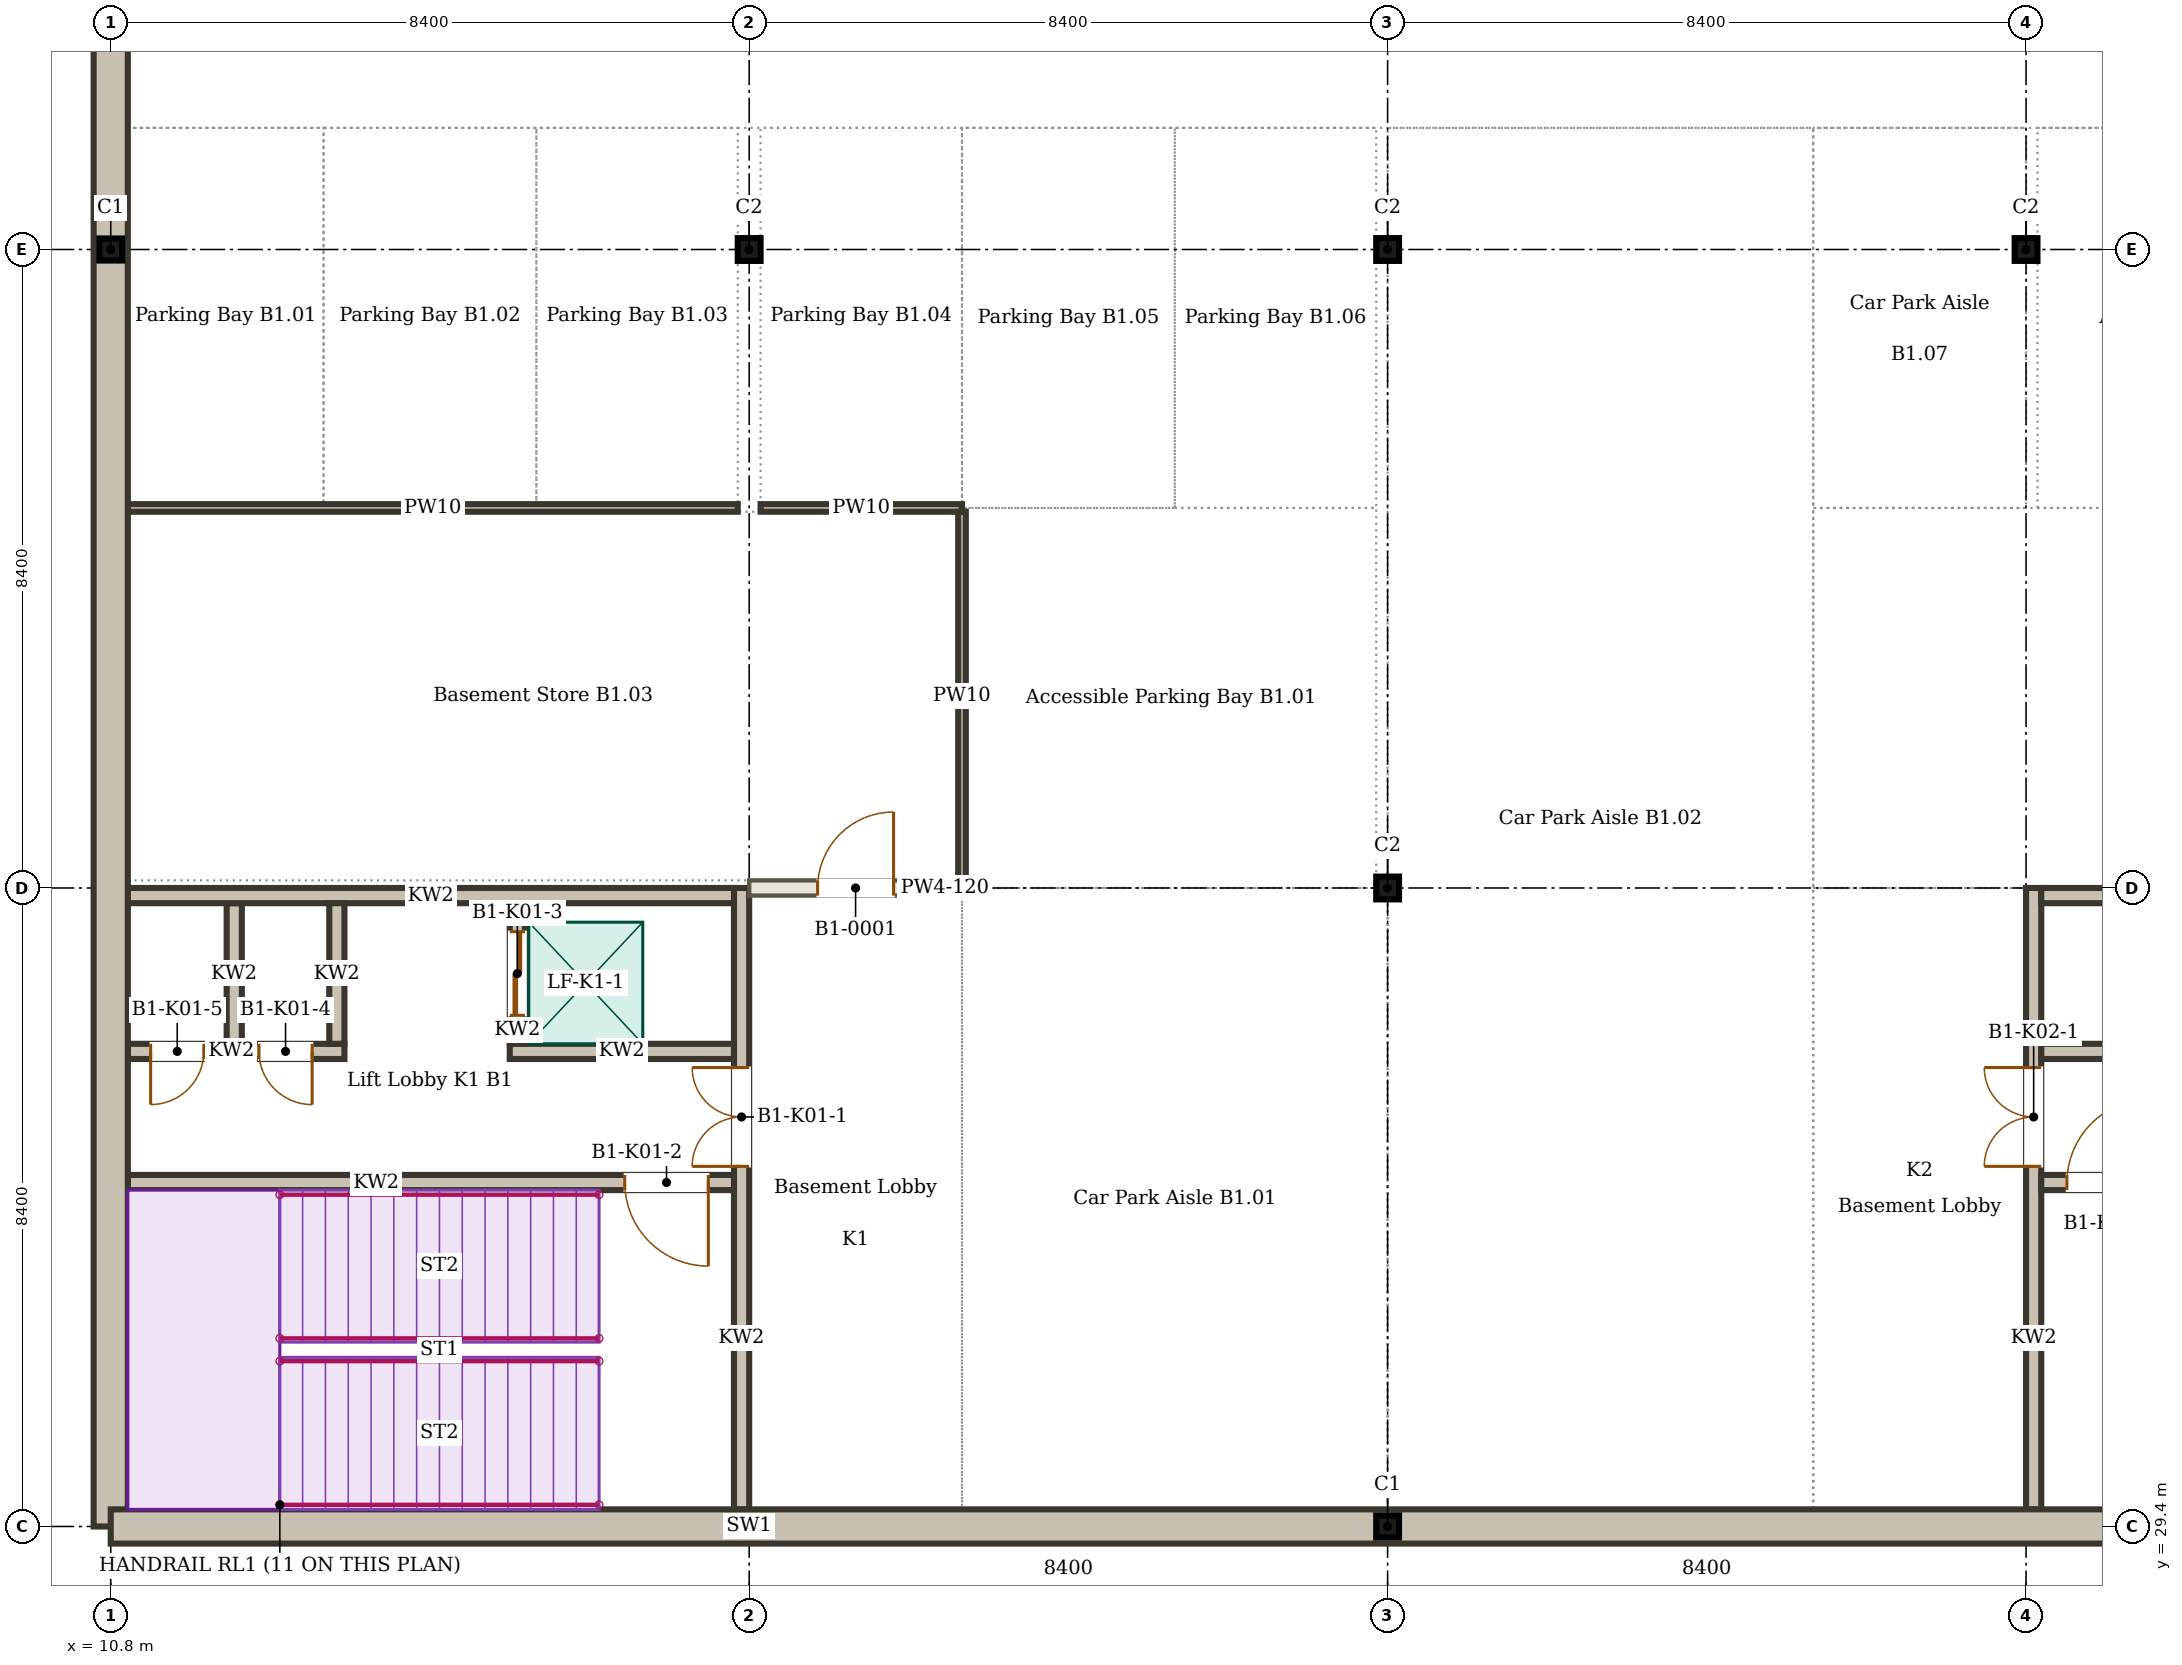
"""IFC4 building model, lengths in metres.
Left out: names, types, materials, properties, quantities, classifications, styles, units other than length and angle.
Written with IfcOpenShell. Run it as: python <this file> out.ifc"""

import sys

from ifc_helpers import new_model, si_unit, direction, frame, frame_2d, origin, origin_2d, place, context, subcontext, project, spatial, rectangle, i_section, extrude, element, fill, save


model = new_model("IFC4")
c1 = context("Model", 3, precision=1e-05, world=origin(), true_north=direction((0.0, 1.0)))
c2 = subcontext(c1, "Body", "Model", "MODEL_VIEW")
j1 = project(units=[si_unit("LENGTHUNIT", "METRE"), si_unit("PLANEANGLEUNIT", "RADIAN")], contexts=[c1])
p1 = place(None, origin())
s1 = spatial("IfcSite", under=j1, at=p1, CompositionType="ELEMENT")
p2 = place(p1, origin())
s2 = spatial("IfcBuilding", under=s1, at=p2, CompositionType="ELEMENT")
p3 = place(p2, frame((0.0, 0.0, -4.5)))
s3 = spatial("IfcBuildingStorey", under=s2, at=p3, CompositionType="ELEMENT", Elevation=-4.5)
p4 = place(p3, frame((27.6, 29.4, 0.0), z_axis=(0.0, 0.0, 1.0), x_axis=(1.0, 0.0, 0.0)))
e1 = element("IfcColumn", 1, at=p4, inside=s3, PredefinedType="COLUMN", context=c2, shape_type="SweptSolid", body=[
    extrude(i_section(OverallWidth=0.3, OverallDepth=0.29, WebThickness=0.009, FlangeThickness=0.014, FilletRadius=0.027, at=origin_2d()), origin(), (0.0, 0.0, 1.0), 4.5),
])
p5 = place(p3, frame((27.6, 37.8, 0.0), z_axis=(0.0, 0.0, 1.0), x_axis=(1.0, 0.0, 0.0)))
e2 = element("IfcColumn", 2, at=p5, inside=s3, PredefinedType="COLUMN", context=c2, shape_type="SweptSolid", body=[
    extrude(i_section(OverallWidth=0.3, OverallDepth=0.3, WebThickness=0.011, FlangeThickness=0.019, FilletRadius=0.027, at=origin_2d()), origin(), (0.0, 0.0, 1.0), 4.5),
])
p6 = place(p3, frame((10.8, 46.2, 0.0), z_axis=(0.0, 0.0, 1.0), x_axis=(1.0, 0.0, 0.0)))
e3 = element("IfcColumn", 3, at=p6, inside=s3, PredefinedType="COLUMN", context=c2, shape_type="SweptSolid", body=[
    extrude(i_section(OverallWidth=0.3, OverallDepth=0.29, WebThickness=0.009, FlangeThickness=0.014, FilletRadius=0.027, at=origin_2d()), origin(), (0.0, 0.0, 1.0), 4.5),
])
for number, where, z_axis, x_axis in (
    (4, (19.2, 46.2, 0.0), (0.0, 0.0, 1.0), (1.0, 0.0, 0.0)),
    (5, (27.6, 46.2, 0.0), (0.0, 0.0, 1.0), (1.0, 0.0, 0.0)),
    (6, (36.0, 46.2, 0.0), (0.0, 0.0, 1.0), (1.0, 0.0, 0.0)),
):
    element("IfcColumn", number, at=place(p3, frame(where, z_axis=z_axis, x_axis=x_axis)), inside=s3, PredefinedType="COLUMN", context=c2, shape_type="SweptSolid", body=[
        extrude(i_section(OverallWidth=0.3, OverallDepth=0.3, WebThickness=0.011, FlangeThickness=0.019, FilletRadius=0.027, at=origin_2d()), origin(), (0.0, 0.0, 1.0), 4.5),
    ])
p7 = place(p3, frame((10.8, 96.6, 0.0), z_axis=(0.0, 0.0, 1.0), x_axis=(0.0, -1.0, 0.0)))
e7 = element("IfcWall", 7, at=p7, inside=s3, PredefinedType="SOLIDWALL", context=c2, shape_type="SweptSolid", body=[
    extrude(rectangle(XDim=67.2, YDim=0.45, at=frame_2d((33.6, 0.0))), origin(), (0.0, 0.0, 1.0), 4.35),
])
p8 = place(p3, frame((10.8, 29.4, 0.0), z_axis=(0.0, 0.0, 1.0), x_axis=(1.0, 0.0, 0.0)))
e8 = element("IfcWall", 8, at=p8, inside=s3, PredefinedType="SOLIDWALL", context=c2, shape_type="SweptSolid", body=[
    extrude(rectangle(XDim=33.6, YDim=0.45, at=frame_2d((16.8, 0.0))), origin(), (0.0, 0.0, 1.0), 4.35),
])
p9 = place(p3, frame((19.2, 37.8, 0.0), z_axis=(0.0, 0.0, 1.0), x_axis=(1.0, 0.0, 0.0)))
e9 = element("IfcWall", 9, at=p9, inside=s3, PredefinedType="PARTITIONING", context=c2, shape_type="SweptSolid", body=[
    extrude(rectangle(XDim=2.8, YDim=0.2, at=frame_2d((1.4, 0.0))), origin(), (0.0, 0.0, 1.0), 3.8),
])
p10 = place(p9, frame((0.9, 0.0, 0.0)))
e10 = element("IfcOpeningElement", 10, at=p10, cuts=e9, PredefinedType="OPENING", context=c2, shape_type="SweptSolid", body=[
    extrude(rectangle(XDim=1.0, YDim=2.1, at=frame_2d((0.5, 1.05))), frame((0.0, 0.11, 0.0), z_axis=(0.0, -1.0, 0.0), x_axis=(1.0, 0.0, 0.0)), (0.0, 0.0, 1.0), 0.22),
])
p11 = place(p3, frame((11.025, 42.8, 0.0), z_axis=(0.0, 0.0, 1.0), x_axis=(1.0, 0.0, 0.0)))
e11 = element("IfcWall", 11, at=p11, inside=s3, PredefinedType="SOLIDWALL", context=c2, shape_type="SweptSolid", body=[
    extrude(rectangle(XDim=8.025, YDim=0.1, at=frame_2d((4.013, 0.0))), origin(), (0.0, 0.0, 1.0), 3.95),
])
p12 = place(p3, frame((19.35, 42.8, 0.0), z_axis=(0.0, 0.0, 1.0), x_axis=(1.0, 0.0, 0.0)))
e12 = element("IfcWall", 12, at=p12, inside=s3, PredefinedType="SOLIDWALL", context=c2, shape_type="SweptSolid", body=[
    extrude(rectangle(XDim=2.65, YDim=0.1, at=frame_2d((1.325, 0.0))), origin(), (0.0, 0.0, 1.0), 3.95),
])
p13 = place(p3, frame((22.0, 37.9, 0.0), z_axis=(0.0, 0.0, 1.0), x_axis=(0.0, 1.0, 0.0)))
e13 = element("IfcWall", 13, at=p13, inside=s3, PredefinedType="SOLIDWALL", context=c2, shape_type="SweptSolid", body=[
    extrude(rectangle(XDim=4.85, YDim=0.1, at=frame_2d((2.425, 0.0))), origin(), (0.0, 0.0, 1.0), 3.8),
])
p14 = place(p3, frame((19.1, 29.625, 0.0), z_axis=(0.0, 0.0, 1.0), x_axis=(0.0, 1.0, 0.0)))
e14 = element("IfcWall", 14, at=p14, inside=s3, PredefinedType="SOLIDWALL", context=c2, shape_type="SweptSolid", body=[
    extrude(rectangle(XDim=8.175, YDim=0.2, at=frame_2d((4.087, 0.0))), origin(), (0.0, 0.0, 1.0), 4.5),
])
p15 = place(p14, frame((4.512, 0.0, 0.0)))
e15 = element("IfcOpeningElement", 15, at=p15, cuts=e14, PredefinedType="OPENING", context=c2, shape_type="SweptSolid", body=[
    extrude(rectangle(XDim=1.3, YDim=2.1, at=frame_2d((0.65, 1.05))), frame((0.0, 0.11, 0.0), z_axis=(0.0, -1.0, 0.0), x_axis=(1.0, 0.0, 0.0)), (0.0, 0.0, 1.0), 0.22),
])
p16 = place(p3, frame((19.0, 37.7, 0.0), z_axis=(0.0, 0.0, 1.0), x_axis=(-1.0, 0.0, 0.0)))
e16 = element("IfcWall", 16, at=p16, inside=s3, PredefinedType="SOLIDWALL", context=c2, shape_type="SweptSolid", body=[
    extrude(rectangle(XDim=7.975, YDim=0.2, at=frame_2d((3.988, 0.0))), origin(), (0.0, 0.0, 1.0), 4.5),
])
p17 = place(p3, frame((19.0, 33.925, 0.0), z_axis=(0.0, 0.0, 1.0), x_axis=(-1.0, 0.0, 0.0)))
e17 = element("IfcWall", 17, at=p17, inside=s3, PredefinedType="SOLIDWALL", context=c2, shape_type="SweptSolid", body=[
    extrude(rectangle(XDim=7.975, YDim=0.2, at=frame_2d((3.988, 0.0))), origin(), (0.0, 0.0, 1.0), 4.5),
])
p18 = place(p17, frame((0.337, 0.0, 0.0)))
e18 = element("IfcOpeningElement", 18, at=p18, cuts=e17, PredefinedType="OPENING", context=c2, shape_type="SweptSolid", body=[
    extrude(rectangle(XDim=1.1, YDim=2.1, at=frame_2d((0.55, 1.05))), frame((0.0, 0.11, 0.0), z_axis=(0.0, -1.0, 0.0), x_axis=(1.0, 0.0, 0.0)), (0.0, 0.0, 1.0), 0.22),
])
p19 = place(p3, frame((19.0, 35.65, 0.0), z_axis=(0.0, 0.0, 1.0), x_axis=(-1.0, 0.0, 0.0)))
e19 = element("IfcWall", 19, at=p19, inside=s3, PredefinedType="SOLIDWALL", context=c2, shape_type="SweptSolid", body=[
    extrude(rectangle(XDim=2.95, YDim=0.2, at=frame_2d((1.475, 0.0))), origin(), (0.0, 0.0, 1.0), 4.5),
])
p20 = place(p3, frame((13.875, 35.65, 0.0), z_axis=(0.0, 0.0, 1.0), x_axis=(-1.0, 0.0, 0.0)))
e20 = element("IfcWall", 20, at=p20, inside=s3, PredefinedType="SOLIDWALL", context=c2, shape_type="SweptSolid", body=[
    extrude(rectangle(XDim=2.85, YDim=0.2, at=frame_2d((1.425, 0.0))), origin(), (0.0, 0.0, 1.0), 4.35),
])
p21 = place(p20, frame((0.425, 0.0, 0.0)))
e21 = element("IfcOpeningElement", 21, at=p21, cuts=e20, PredefinedType="OPENING", context=c2, shape_type="SweptSolid", body=[
    extrude(rectangle(XDim=0.7, YDim=2.1, at=frame_2d((0.35, 1.05))), frame((0.0, 0.11, 0.0), z_axis=(0.0, -1.0, 0.0), x_axis=(1.0, 0.0, 0.0)), (0.0, 0.0, 1.0), 0.22),
])
p22 = place(p20, frame((1.85, 0.0, 0.0)))
e22 = element("IfcOpeningElement", 22, at=p22, cuts=e20, PredefinedType="OPENING", context=c2, shape_type="SweptSolid", body=[
    extrude(rectangle(XDim=0.7, YDim=2.1, at=frame_2d((0.35, 1.05))), frame((0.0, 0.11, 0.0), z_axis=(0.0, -1.0, 0.0), x_axis=(1.0, 0.0, 0.0)), (0.0, 0.0, 1.0), 0.22),
])
p23 = place(p3, frame((16.15, 35.75, 0.0), z_axis=(0.0, 0.0, 1.0), x_axis=(0.0, 1.0, 0.0)))
e23 = element("IfcWall", 23, at=p23, inside=s3, PredefinedType="SOLIDWALL", context=c2, shape_type="SweptSolid", body=[
    extrude(rectangle(XDim=1.85, YDim=0.2, at=frame_2d((0.925, 0.0))), origin(), (0.0, 0.0, 1.0), 4.5),
])
p24 = place(p23, frame((0.375, 0.0, 0.0)))
e24 = element("IfcOpeningElement", 24, at=p24, cuts=e23, PredefinedType="OPENING", context=c2, shape_type="SweptSolid", body=[
    extrude(rectangle(XDim=1.1, YDim=2.1, at=frame_2d((0.55, 1.05))), frame((0.0, 0.11, 0.0), z_axis=(0.0, -1.0, 0.0), x_axis=(1.0, 0.0, 0.0)), (0.0, 0.0, 1.0), 0.22),
])
for number, where, z_axis, x_axis in (
    (25, (13.775, 35.75, 0.0), (0.0, 0.0, 1.0), (0.0, 1.0, 0.0)),
    (26, (12.425, 35.75, 0.0), (0.0, 0.0, 1.0), (0.0, 1.0, 0.0)),
):
    element("IfcWall", number, at=place(p3, frame(where, z_axis=z_axis, x_axis=x_axis)), inside=s3, PredefinedType="SOLIDWALL", context=c2, shape_type="SweptSolid", body=[
        extrude(rectangle(XDim=1.85, YDim=0.2, at=frame_2d((0.925, 0.0))), origin(), (0.0, 0.0, 1.0), 4.35),
    ])
p25 = place(p3, frame((36.1, 29.625, 0.0), z_axis=(0.0, 0.0, 1.0), x_axis=(0.0, 1.0, 0.0)))
e27 = element("IfcWall", 27, at=p25, inside=s3, PredefinedType="SOLIDWALL", context=c2, shape_type="SweptSolid", body=[
    extrude(rectangle(XDim=8.175, YDim=0.2, at=frame_2d((4.087, 0.0))), origin(), (0.0, 0.0, 1.0), 4.5),
])
p26 = place(p25, frame((4.512, 0.0, 0.0)))
e28 = element("IfcOpeningElement", 28, at=p26, cuts=e27, PredefinedType="OPENING", context=c2, shape_type="SweptSolid", body=[
    extrude(rectangle(XDim=1.3, YDim=2.1, at=frame_2d((0.65, 1.05))), frame((0.0, 0.11, 0.0), z_axis=(0.0, -1.0, 0.0), x_axis=(1.0, 0.0, 0.0)), (0.0, 0.0, 1.0), 0.22),
])
p27 = place(p3, frame((36.2, 37.7, 0.0), z_axis=(0.0, 0.0, 1.0), x_axis=(1.0, 0.0, 0.0)))
e29 = element("IfcWall", 29, at=p27, inside=s3, PredefinedType="SOLIDWALL", context=c2, shape_type="SweptSolid", body=[
    extrude(rectangle(XDim=7.975, YDim=0.2, at=frame_2d((3.988, 0.0))), origin(), (0.0, 0.0, 1.0), 4.5),
])
p28 = place(p3, frame((36.2, 33.925, 0.0), z_axis=(0.0, 0.0, 1.0), x_axis=(1.0, 0.0, 0.0)))
e30 = element("IfcWall", 30, at=p28, inside=s3, PredefinedType="SOLIDWALL", context=c2, shape_type="SweptSolid", body=[
    extrude(rectangle(XDim=7.975, YDim=0.2, at=frame_2d((3.988, 0.0))), origin(), (0.0, 0.0, 1.0), 4.5),
])
p29 = place(p28, frame((0.337, 0.0, 0.0)))
e31 = element("IfcOpeningElement", 31, at=p29, cuts=e30, PredefinedType="OPENING", context=c2, shape_type="SweptSolid", body=[
    extrude(rectangle(XDim=1.1, YDim=2.1, at=frame_2d((0.55, 1.05))), frame((0.0, 0.11, 0.0), z_axis=(0.0, -1.0, 0.0), x_axis=(1.0, 0.0, 0.0)), (0.0, 0.0, 1.0), 0.22),
])
p30 = place(p3, frame((36.2, 35.65, 0.0), z_axis=(0.0, 0.0, 1.0), x_axis=(1.0, 0.0, 0.0)))
e32 = element("IfcWall", 32, at=p30, inside=s3, PredefinedType="SOLIDWALL", context=c2, shape_type="SweptSolid", body=[
    extrude(rectangle(XDim=2.95, YDim=0.2, at=frame_2d((1.475, 0.0))), origin(), (0.0, 0.0, 1.0), 4.5),
])
p31 = place(p10, origin())
e33 = element("IfcDoor", 33, at=p31, inside=s3, OperationType="SINGLE_SWING_RIGHT", PredefinedType="DOOR", context=c2, shape_type="SweptSolid", body=[
    extrude(rectangle(XDim=1.0, YDim=2.1, at=frame_2d((0.5, 1.05))), frame((0.0, 0.025, 0.0), z_axis=(0.0, -1.0, 0.0), x_axis=(1.0, 0.0, 0.0)), (0.0, 0.0, 1.0), 0.05),
])
fill(e10, e33)
p32 = place(p15, origin())
e34 = element("IfcDoor", 34, at=p32, inside=s3, OperationType="DOUBLE_DOOR_DOUBLE_SWING", PredefinedType="DOOR", context=c2, shape_type="SweptSolid", body=[
    extrude(rectangle(XDim=1.3, YDim=2.1, at=frame_2d((0.65, 1.05))), frame((0.0, 0.025, 0.0), z_axis=(0.0, -1.0, 0.0), x_axis=(1.0, 0.0, 0.0)), (0.0, 0.0, 1.0), 0.05),
])
fill(e15, e34)
p33 = place(p18, origin())
e35 = element("IfcDoor", 35, at=p33, inside=s3, OperationType="SINGLE_SWING_LEFT", PredefinedType="DOOR", context=c2, shape_type="SweptSolid", body=[
    extrude(rectangle(XDim=1.1, YDim=2.1, at=frame_2d((0.55, 1.05))), frame((0.0, 0.025, 0.0), z_axis=(0.0, -1.0, 0.0), x_axis=(1.0, 0.0, 0.0)), (0.0, 0.0, 1.0), 0.05),
])
fill(e18, e35)
p34 = place(p24, origin())
e36 = element("IfcDoor", 36, at=p34, inside=s3, OperationType="DOUBLE_DOOR_SLIDING", PredefinedType="DOOR", context=c2, shape_type="SweptSolid", body=[
    extrude(rectangle(XDim=1.1, YDim=2.1, at=frame_2d((0.55, 1.05))), frame((0.0, 0.025, 0.0), z_axis=(0.0, -1.0, 0.0), x_axis=(1.0, 0.0, 0.0)), (0.0, 0.0, 1.0), 0.05),
])
fill(e24, e36)
p35 = place(p21, origin())
e37 = element("IfcDoor", 37, at=p35, inside=s3, OperationType="SINGLE_SWING_LEFT", PredefinedType="DOOR", context=c2, shape_type="SweptSolid", body=[
    extrude(rectangle(XDim=0.7, YDim=2.1, at=frame_2d((0.35, 1.05))), frame((0.0, 0.025, 0.0), z_axis=(0.0, -1.0, 0.0), x_axis=(1.0, 0.0, 0.0)), (0.0, 0.0, 1.0), 0.05),
])
fill(e21, e37)
p36 = place(p22, origin())
e38 = element("IfcDoor", 38, at=p36, inside=s3, OperationType="SINGLE_SWING_RIGHT", PredefinedType="DOOR", context=c2, shape_type="SweptSolid", body=[
    extrude(rectangle(XDim=0.7, YDim=2.1, at=frame_2d((0.35, 1.05))), frame((0.0, 0.025, 0.0), z_axis=(0.0, -1.0, 0.0), x_axis=(1.0, 0.0, 0.0)), (0.0, 0.0, 1.0), 0.05),
])
fill(e22, e38)
p37 = place(p26, origin())
e39 = element("IfcDoor", 39, at=p37, inside=s3, OperationType="DOUBLE_DOOR_DOUBLE_SWING", PredefinedType="DOOR", context=c2, shape_type="SweptSolid", body=[
    extrude(rectangle(XDim=1.3, YDim=2.1, at=frame_2d((0.65, 1.05))), frame((0.0, 0.025, 0.0), z_axis=(0.0, -1.0, 0.0), x_axis=(1.0, 0.0, 0.0)), (0.0, 0.0, 1.0), 0.05),
])
fill(e28, e39)
p38 = place(p29, origin())
e40 = element("IfcDoor", 40, at=p38, inside=s3, OperationType="SINGLE_SWING_RIGHT", PredefinedType="DOOR", context=c2, shape_type="SweptSolid", body=[
    extrude(rectangle(XDim=1.1, YDim=2.1, at=frame_2d((0.55, 1.05))), frame((0.0, 0.025, 0.0), z_axis=(0.0, -1.0, 0.0), x_axis=(1.0, 0.0, 0.0)), (0.0, 0.0, 1.0), 0.05),
])
fill(e31, e40)
save(model, sys.argv[1])
